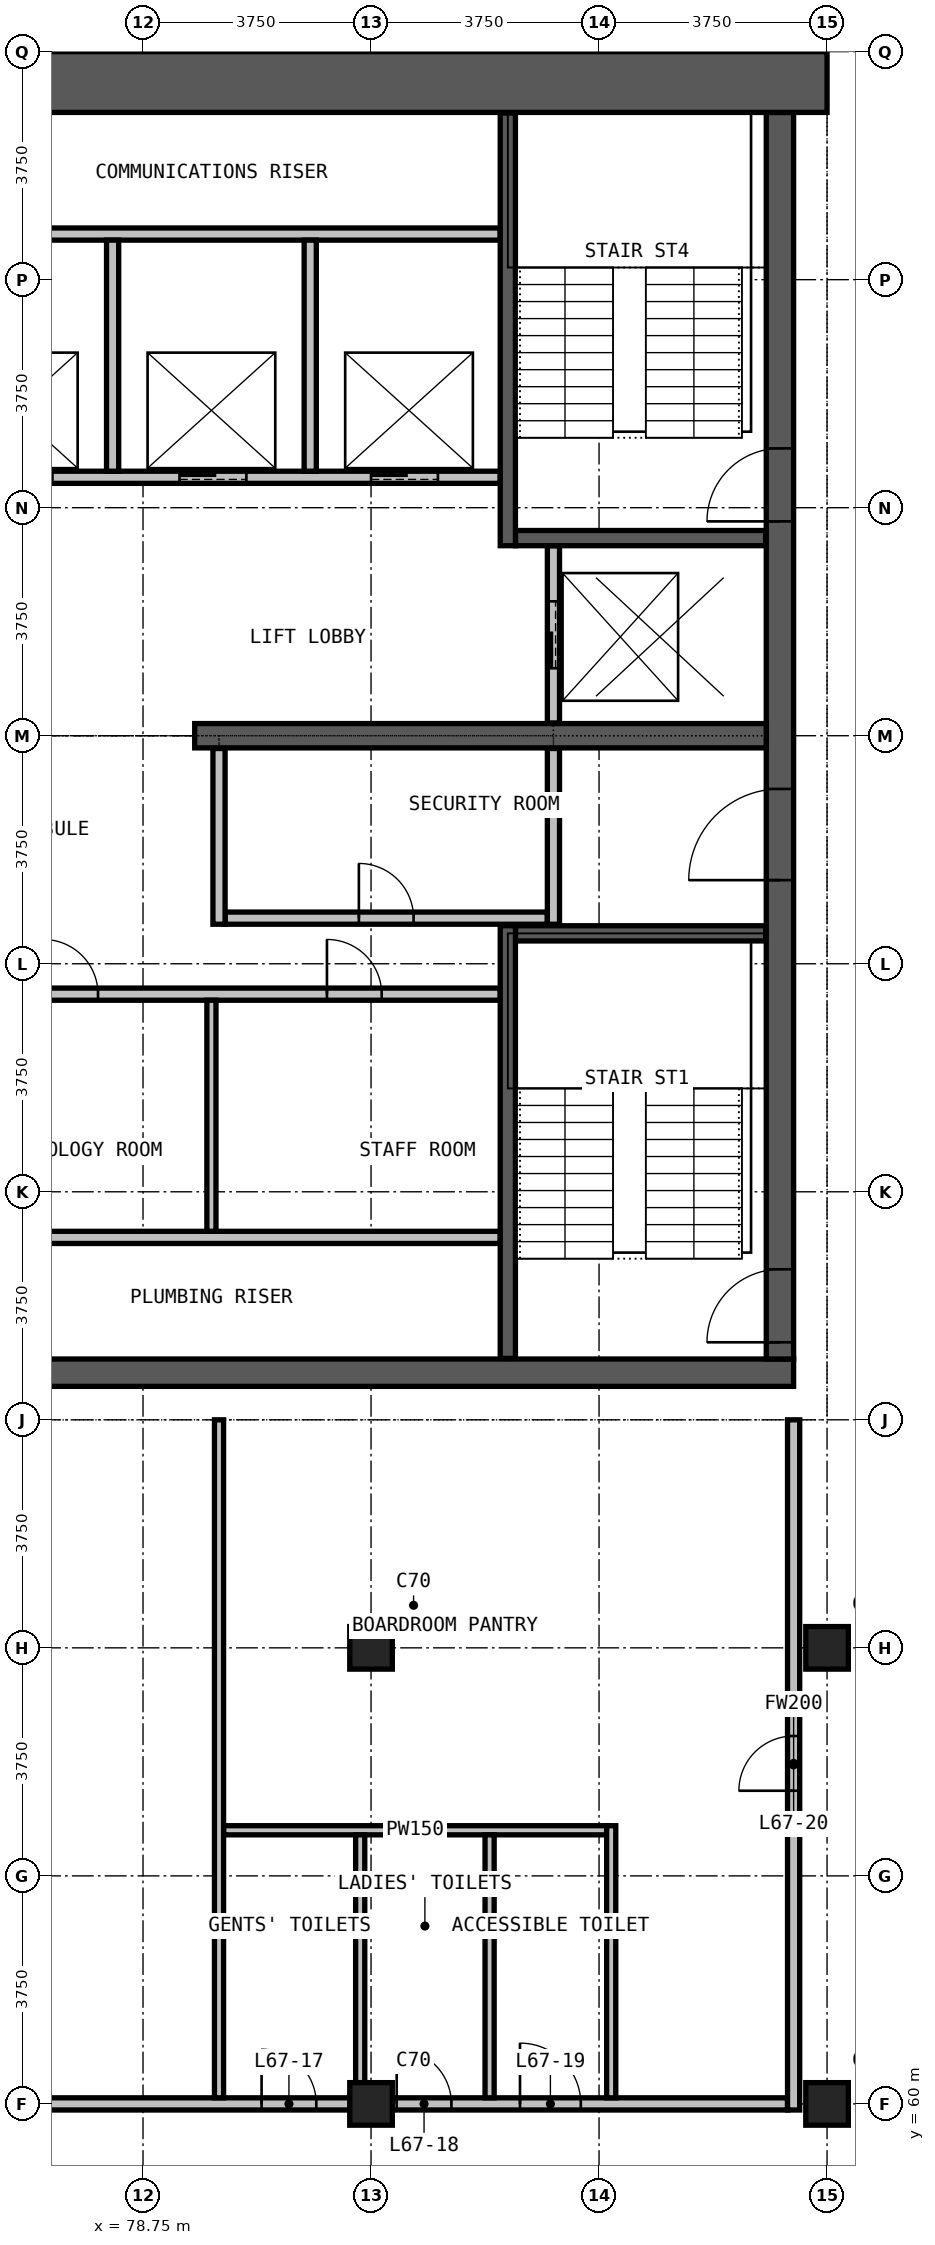
"""IFC4 building model, lengths in metres.
Left out: names, types, materials, properties, quantities, classifications, styles, units other than length and angle.
Written with IfcOpenShell. Run it as: python <this file> out.ifc"""

import sys

from ifc_helpers import new_model, si_unit, direction, frame, frame_2d, origin, origin_2d, place, context, subcontext, project, spatial, rectangle, extrude, element, fill, save


model = new_model("IFC4")
c1 = context("Model", 3, precision=1e-05, world=origin(), true_north=direction((0.0, 1.0)))
c2 = subcontext(c1, "Body", "Model", "MODEL_VIEW")
j1 = project(units=[si_unit("LENGTHUNIT", "METRE"), si_unit("PLANEANGLEUNIT", "RADIAN")], contexts=[c1])
p1 = place(None, origin())
s1 = spatial("IfcSite", under=j1, at=p1, CompositionType="ELEMENT")
p2 = place(p1, origin())
s2 = spatial("IfcBuilding", under=s1, at=p2, CompositionType="ELEMENT")
p3 = place(p2, frame((0.0, 0.0, 258.5)))
s3 = spatial("IfcBuildingStorey", under=s2, at=p3, CompositionType="ELEMENT", Elevation=258.5)
for number, where, z_axis, x_axis in (
    (1, (82.5, 60.0, 0.0), (0.0, 0.0, 1.0), (1.0, 0.0, 0.0)),
    (2, (82.5, 67.5, 0.0), (0.0, 0.0, 1.0), (1.0, 0.0, 0.0)),
    (3, (90.0, 60.0, 0.0), (0.0, 0.0, 1.0), (1.0, 0.0, 0.0)),
    (4, (90.0, 67.5, 0.0), (0.0, 0.0, 1.0), (1.0, 0.0, 0.0)),
):
    element("IfcColumn", number, at=place(p3, frame(where, z_axis=z_axis, x_axis=x_axis)), inside=s3, PredefinedType="COLUMN", context=c2, shape_type="SweptSolid", body=[
        extrude(rectangle(XDim=0.7, YDim=0.7, at=origin_2d()), origin(), (0.0, 0.0, 1.0), 3.6),
    ])
p4 = place(p3, frame((60.55, 72.025, 0.0), z_axis=(0.0, 0.0, 1.0), x_axis=(1.0, 0.0, 0.0)))
e5 = element("IfcWall", 5, at=p4, inside=s3, PredefinedType="SHEAR", context=c2, shape_type="SweptSolid", body=[
    extrude(rectangle(XDim=28.9, YDim=0.45, at=frame_2d((14.45, 0.0))), origin(), (0.0, 0.0, 1.0), 3.6),
])
p5 = place(p3, frame((89.225, 72.25, 0.0), z_axis=(0.0, 0.0, 1.0), x_axis=(0.0, 1.0, 0.0)))
e6 = element("IfcWall", 6, at=p5, inside=s3, PredefinedType="SHEAR", context=c2, shape_type="SweptSolid", body=[
    extrude(rectangle(XDim=20.5, YDim=0.45, at=frame_2d((10.25, 0.0))), origin(), (0.0, 0.0, 1.0), 3.6),
])
p6 = place(p5, frame((0.275, 0.0, 0.0)))
e7 = element("IfcOpeningElement", 7, at=p6, cuts=e6, PredefinedType="OPENING", context=c2, shape_type="SweptSolid", body=[
    extrude(rectangle(XDim=1.2, YDim=2.2, at=frame_2d((0.6, 1.1))), frame((0.0, 0.235, 0.0), z_axis=(0.0, -1.0, 0.0), x_axis=(1.0, 0.0, 0.0)), (0.0, 0.0, 1.0), 0.47),
])
p7 = place(p5, frame((13.775, 0.0, 0.0)))
e8 = element("IfcOpeningElement", 8, at=p7, cuts=e6, PredefinedType="OPENING", context=c2, shape_type="SweptSolid", body=[
    extrude(rectangle(XDim=1.2, YDim=2.2, at=frame_2d((0.6, 1.1))), frame((0.0, 0.235, 0.0), z_axis=(0.0, -1.0, 0.0), x_axis=(1.0, 0.0, 0.0)), (0.0, 0.0, 1.0), 0.47),
])
p8 = place(p5, frame((7.875, 0.0, 0.0)))
e9 = element("IfcOpeningElement", 9, at=p8, cuts=e6, PredefinedType="OPENING", context=c2, shape_type="SweptSolid", body=[
    extrude(rectangle(XDim=1.5, YDim=2.2, at=frame_2d((0.75, 1.1))), frame((0.0, 0.235, 0.0), z_axis=(0.0, -1.0, 0.0), x_axis=(1.0, 0.0, 0.0)), (0.0, 0.0, 1.0), 0.47),
])
p9 = place(p3, frame((90.0, 93.25, 0.0), z_axis=(0.0, 0.0, 1.0), x_axis=(-1.0, 0.0, 0.0)))
e10 = element("IfcWall", 10, at=p9, inside=s3, PredefinedType="SHEAR", context=c2, shape_type="SweptSolid", body=[
    extrude(rectangle(XDim=30.0, YDim=1.0, at=frame_2d((15.0, 0.0))), origin(), (0.0, 0.0, 1.0), 3.6),
])
p10 = place(p3, frame((79.6, 82.5, 0.0), z_axis=(0.0, 0.0, 1.0), x_axis=(1.0, 0.0, 0.0)))
e11 = element("IfcWall", 11, at=p10, inside=s3, PredefinedType="SHEAR", context=c2, shape_type="SweptSolid", body=[
    extrude(rectangle(XDim=9.4, YDim=0.4, at=frame_2d((4.7, 0.0))), origin(), (0.0, 0.0, 1.0), 3.6),
])
p11 = place(p3, frame((75.21, 74.25, 0.0), z_axis=(0.0, 0.0, 1.0), x_axis=(1.0, 0.0, 0.0)))
e12 = element("IfcWall", 12, at=p11, inside=s3, PredefinedType="PARTITIONING", context=c2, shape_type="SweptSolid", body=[
    extrude(rectangle(XDim=9.415, YDim=0.2, at=frame_2d((4.708, 0.0))), origin(), (0.0, 0.0, 1.0), 3.3),
])
p12 = place(p3, frame((75.21, 78.25, 0.0), z_axis=(0.0, 0.0, 1.0), x_axis=(1.0, 0.0, 0.0)))
e13 = element("IfcWall", 13, at=p12, inside=s3, PredefinedType="PARTITIONING", context=c2, shape_type="SweptSolid", body=[
    extrude(rectangle(XDim=9.415, YDim=0.2, at=frame_2d((4.708, 0.0))), origin(), (0.0, 0.0, 1.0), 3.3),
])
p13 = place(p12, frame((1.9, 0.0, 0.0)))
e14 = element("IfcOpeningElement", 14, at=p13, cuts=e13, PredefinedType="OPENING", context=c2, shape_type="SweptSolid", body=[
    extrude(rectangle(XDim=0.9, YDim=2.2, at=frame_2d((0.45, 1.1))), frame((0.0, 0.11, 0.0), z_axis=(0.0, -1.0, 0.0), x_axis=(1.0, 0.0, 0.0)), (0.0, 0.0, 1.0), 0.22),
])
p14 = place(p12, frame((6.565, 0.0, 0.0)))
e15 = element("IfcOpeningElement", 15, at=p14, cuts=e13, PredefinedType="OPENING", context=c2, shape_type="SweptSolid", body=[
    extrude(rectangle(XDim=0.9, YDim=2.2, at=frame_2d((0.45, 1.1))), frame((0.0, 0.11, 0.0), z_axis=(0.0, -1.0, 0.0), x_axis=(1.0, 0.0, 0.0)), (0.0, 0.0, 1.0), 0.22),
])
p15 = place(p3, frame((80.1, 79.5, 0.0), z_axis=(0.0, 0.0, 1.0), x_axis=(1.0, 0.0, 0.0)))
e16 = element("IfcWall", 16, at=p15, inside=s3, PredefinedType="PARTITIONING", context=c2, shape_type="SweptSolid", body=[
    extrude(rectangle(XDim=5.3, YDim=0.2, at=frame_2d((2.65, 0.0))), origin(), (0.0, 0.0, 1.0), 3.3),
])
p16 = place(p15, frame((2.2, 0.0, 0.0)))
e17 = element("IfcOpeningElement", 17, at=p16, cuts=e16, PredefinedType="OPENING", context=c2, shape_type="SweptSolid", body=[
    extrude(rectangle(XDim=0.9, YDim=2.2, at=frame_2d((0.45, 1.1))), frame((0.0, 0.11, 0.0), z_axis=(0.0, -1.0, 0.0), x_axis=(1.0, 0.0, 0.0)), (0.0, 0.0, 1.0), 0.22),
])
for number, where, z_axis, x_axis in (
    (18, (80.0, 79.4, 0.0), (0.0, 0.0, 1.0), (0.0, 1.0, 0.0)),
    (19, (85.5, 79.4, 0.0), (0.0, 0.0, 1.0), (0.0, 1.0, 0.0)),
):
    element("IfcWall", number, at=place(p3, frame(where, z_axis=z_axis, x_axis=x_axis)), inside=s3, PredefinedType="PARTITIONING", context=c2, shape_type="SweptSolid", body=[
        extrude(rectangle(XDim=2.89, YDim=0.2, at=frame_2d((1.445, 0.0))), origin(), (0.0, 0.0, 1.0), 3.3),
    ])
p17 = place(p3, frame((60.65, 60.0, 0.0), z_axis=(0.0, 0.0, 1.0), x_axis=(1.0, 0.0, 0.0)))
e20 = element("IfcWall", 20, at=p17, inside=s3, PredefinedType="PARTITIONING", context=c2, shape_type="SweptSolid", body=[
    extrude(rectangle(XDim=28.7, YDim=0.2, at=frame_2d((14.35, 0.0))), origin(), (0.0, 0.0, 1.0), 3.3),
])
p18 = place(p17, frame((13.0, 0.0, 0.0)))
e21 = element("IfcOpeningElement", 21, at=p18, cuts=e20, PredefinedType="OPENING", context=c2, shape_type="SweptSolid", body=[
    extrude(rectangle(XDim=1.0, YDim=2.2, at=frame_2d((0.5, 1.1))), frame((0.0, 0.11, 0.0), z_axis=(0.0, -1.0, 0.0), x_axis=(1.0, 0.0, 0.0)), (0.0, 0.0, 1.0), 0.22),
])
p19 = place(p17, frame((20.05, 0.0, 0.0)))
e22 = element("IfcOpeningElement", 22, at=p19, cuts=e20, PredefinedType="OPENING", context=c2, shape_type="SweptSolid", body=[
    extrude(rectangle(XDim=0.9, YDim=2.2, at=frame_2d((0.45, 1.1))), frame((0.0, 0.11, 0.0), z_axis=(0.0, -1.0, 0.0), x_axis=(1.0, 0.0, 0.0)), (0.0, 0.0, 1.0), 0.22),
])
p20 = place(p17, frame((22.272, 0.0, 0.0)))
e23 = element("IfcOpeningElement", 23, at=p20, cuts=e20, PredefinedType="OPENING", context=c2, shape_type="SweptSolid", body=[
    extrude(rectangle(XDim=0.9, YDim=2.2, at=frame_2d((0.45, 1.1))), frame((0.0, 0.11, 0.0), z_axis=(0.0, -1.0, 0.0), x_axis=(1.0, 0.0, 0.0)), (0.0, 0.0, 1.0), 0.22),
])
p21 = place(p17, frame((24.3, 0.0, 0.0)))
e24 = element("IfcOpeningElement", 24, at=p21, cuts=e20, PredefinedType="OPENING", context=c2, shape_type="SweptSolid", body=[
    extrude(rectangle(XDim=1.0, YDim=2.2, at=frame_2d((0.5, 1.1))), frame((0.0, 0.11, 0.0), z_axis=(0.0, -1.0, 0.0), x_axis=(1.0, 0.0, 0.0)), (0.0, 0.0, 1.0), 0.22),
])
p22 = place(p3, frame((89.45, 59.9, 0.0), z_axis=(0.0, 0.0, 1.0), x_axis=(0.0, 1.0, 0.0)))
e25 = element("IfcWall", 25, at=p22, inside=s3, PredefinedType="PARTITIONING", context=c2, shape_type="SweptSolid", body=[
    extrude(rectangle(XDim=11.35, YDim=0.2, at=frame_2d((5.675, 0.0))), origin(), (0.0, 0.0, 1.0), 3.3),
])
p23 = place(p22, frame((5.25, 0.0, 0.0)))
e26 = element("IfcOpeningElement", 26, at=p23, cuts=e25, PredefinedType="OPENING", context=c2, shape_type="SweptSolid", body=[
    extrude(rectangle(XDim=0.9, YDim=2.2, at=frame_2d((0.45, 1.1))), frame((0.0, 0.11, 0.0), z_axis=(0.0, -1.0, 0.0), x_axis=(1.0, 0.0, 0.0)), (0.0, 0.0, 1.0), 0.22),
])
p24 = place(p3, frame((80.075, 64.5, 0.0), z_axis=(0.0, 0.0, 1.0), x_axis=(1.0, 0.0, 0.0)))
e27 = element("IfcWall", 27, at=p24, inside=s3, PredefinedType="PARTITIONING", context=c2, shape_type="SweptSolid", body=[
    extrude(rectangle(XDim=6.3, YDim=0.15, at=frame_2d((3.15, 0.0))), origin(), (0.0, 0.0, 1.0), 3.3),
])
p25 = place(p3, frame((79.875, 74.35, 0.0), z_axis=(0.0, 0.0, 1.0), x_axis=(0.0, 1.0, 0.0)))
e28 = element("IfcWall", 28, at=p25, inside=s3, PredefinedType="PARTITIONING", context=c2, shape_type="SweptSolid", body=[
    extrude(rectangle(XDim=3.8, YDim=0.15, at=frame_2d((1.9, 0.0))), origin(), (0.0, 0.0, 1.0), 3.3),
])
p26 = place(p3, frame((80.0, 60.1, 0.0), z_axis=(0.0, 0.0, 1.0), x_axis=(0.0, 1.0, 0.0)))
e29 = element("IfcWall", 29, at=p26, inside=s3, PredefinedType="PARTITIONING", context=c2, shape_type="SweptSolid", body=[
    extrude(rectangle(XDim=11.15, YDim=0.15, at=frame_2d((5.575, 0.0))), origin(), (0.0, 0.0, 1.0), 3.3),
])
for number, where, z_axis, x_axis in (
    (30, (82.322, 60.1, 0.0), (0.0, 0.0, 1.0), (0.0, 1.0, 0.0)),
    (31, (84.45, 60.1, 0.0), (0.0, 0.0, 1.0), (0.0, 1.0, 0.0)),
):
    element("IfcWall", number, at=place(p3, frame(where, z_axis=z_axis, x_axis=x_axis)), inside=s3, PredefinedType="PARTITIONING", context=c2, shape_type="SweptSolid", body=[
        extrude(rectangle(XDim=4.325, YDim=0.15, at=frame_2d((2.163, 0.0))), origin(), (0.0, 0.0, 1.0), 3.3),
    ])
p27 = place(p3, frame((86.45, 60.1, 0.0), z_axis=(0.0, 0.0, 1.0), x_axis=(0.0, 1.0, 0.0)))
e32 = element("IfcWall", 32, at=p27, inside=s3, PredefinedType="PARTITIONING", context=c2, shape_type="SweptSolid", body=[
    extrude(rectangle(XDim=4.475, YDim=0.15, at=frame_2d((2.237, 0.0))), origin(), (0.0, 0.0, 1.0), 3.3),
])
p28 = place(p3, frame((75.21, 86.75, 0.0), z_axis=(0.0, 0.0, 1.0), x_axis=(1.0, 0.0, 0.0)))
e33 = element("IfcWall", 33, at=p28, inside=s3, PredefinedType="PARTITIONING", context=c2, shape_type="SweptSolid", body=[
    extrude(rectangle(XDim=9.415, YDim=0.2, at=frame_2d((4.708, 0.0))), origin(), (0.0, 0.0, 1.0), 3.3),
])
p29 = place(p28, frame((0.95, 0.0, 0.0)))
e34 = element("IfcOpeningElement", 34, at=p29, cuts=e33, PredefinedType="OPENING", context=c2, shape_type="SweptSolid", body=[
    extrude(rectangle(XDim=1.1, YDim=2.2, at=frame_2d((0.55, 1.1))), frame((0.0, 0.11, 0.0), z_axis=(0.0, -1.0, 0.0), x_axis=(1.0, 0.0, 0.0)), (0.0, 0.0, 1.0), 0.22),
])
p30 = place(p28, frame((4.14, 0.0, 0.0)))
e35 = element("IfcOpeningElement", 35, at=p30, cuts=e33, PredefinedType="OPENING", context=c2, shape_type="SweptSolid", body=[
    extrude(rectangle(XDim=1.1, YDim=2.2, at=frame_2d((0.55, 1.1))), frame((0.0, 0.11, 0.0), z_axis=(0.0, -1.0, 0.0), x_axis=(1.0, 0.0, 0.0)), (0.0, 0.0, 1.0), 0.22),
])
p31 = place(p28, frame((7.29, 0.0, 0.0)))
e36 = element("IfcOpeningElement", 36, at=p31, cuts=e33, PredefinedType="OPENING", context=c2, shape_type="SweptSolid", body=[
    extrude(rectangle(XDim=1.1, YDim=2.2, at=frame_2d((0.55, 1.1))), frame((0.0, 0.11, 0.0), z_axis=(0.0, -1.0, 0.0), x_axis=(1.0, 0.0, 0.0)), (0.0, 0.0, 1.0), 0.22),
])
p32 = place(p3, frame((75.21, 90.75, 0.0), z_axis=(0.0, 0.0, 1.0), x_axis=(1.0, 0.0, 0.0)))
e37 = element("IfcWall", 37, at=p32, inside=s3, PredefinedType="PARTITIONING", context=c2, shape_type="SweptSolid", body=[
    extrude(rectangle(XDim=9.415, YDim=0.2, at=frame_2d((4.708, 0.0))), origin(), (0.0, 0.0, 1.0), 3.3),
])
for number, where, z_axis, x_axis in (
    (38, (78.25, 86.85, 0.0), (0.0, 0.0, 1.0), (0.0, 1.0, 0.0)),
    (39, (81.5, 86.85, 0.0), (0.0, 0.0, 1.0), (0.0, 1.0, 0.0)),
):
    element("IfcWall", number, at=place(p3, frame(where, z_axis=z_axis, x_axis=x_axis)), inside=s3, PredefinedType="PARTITIONING", context=c2, shape_type="SweptSolid", body=[
        extrude(rectangle(XDim=3.8, YDim=0.2, at=frame_2d((1.9, 0.0))), origin(), (0.0, 0.0, 1.0), 3.3),
    ])
p33 = place(p3, frame((85.5, 82.71, 0.0), z_axis=(0.0, 0.0, 1.0), x_axis=(0.0, 1.0, 0.0)))
e40 = element("IfcWall", 40, at=p33, inside=s3, PredefinedType="PARTITIONING", context=c2, shape_type="SweptSolid", body=[
    extrude(rectangle(XDim=2.915, YDim=0.2, at=frame_2d((1.458, 0.0))), origin(), (0.0, 0.0, 1.0), 3.3),
])
p34 = place(p33, frame((0.9, 0.0, 0.0)))
e41 = element("IfcOpeningElement", 41, at=p34, cuts=e40, PredefinedType="OPENING", context=c2, shape_type="SweptSolid", body=[
    extrude(rectangle(XDim=1.1, YDim=2.2, at=frame_2d((0.55, 1.1))), frame((0.0, 0.11, 0.0), z_axis=(0.0, -1.0, 0.0), x_axis=(1.0, 0.0, 0.0)), (0.0, 0.0, 1.0), 0.22),
])
for number, where, z_axis, x_axis in (
    (42, (84.875, 79.25, 0.0), (0.0, 0.0, 1.0), (1.0, 0.0, 0.0)),
    (43, (84.875, 85.75, 0.0), (0.0, 0.0, 1.0), (1.0, 0.0, 0.0)),
):
    element("IfcWall", number, at=place(p3, frame(where, z_axis=z_axis, x_axis=x_axis)), inside=s3, PredefinedType="PARTITIONING", context=c2, shape_type="SweptSolid", body=[
        extrude(rectangle(XDim=4.115, YDim=0.25, at=frame_2d((2.058, 0.0))), origin(), (0.0, 0.0, 1.0), 3.3),
    ])
for number, where, z_axis, x_axis in (
    (44, (84.75, 72.26, 0.0), (0.0, 0.0, 1.0), (0.0, 1.0, 0.0)),
    (45, (84.75, 85.625, 0.0), (0.0, 0.0, 1.0), (0.0, 1.0, 0.0)),
):
    element("IfcWall", number, at=place(p3, frame(where, z_axis=z_axis, x_axis=x_axis)), inside=s3, PredefinedType="PARTITIONING", context=c2, shape_type="SweptSolid", body=[
        extrude(rectangle(XDim=7.115, YDim=0.25, at=frame_2d((3.558, 0.0))), origin(), (0.0, 0.0, 1.0), 3.3),
    ])
p35 = place(p29, origin())
e46 = element("IfcDoor", 46, at=p35, inside=s3, OperationType="DOUBLE_DOOR_SLIDING", PredefinedType="DOOR", context=c2, shape_type="SweptSolid", body=[
    extrude(rectangle(XDim=1.1, YDim=2.2, at=frame_2d((0.55, 1.1))), frame((0.0, 0.025, 0.0), z_axis=(0.0, -1.0, 0.0), x_axis=(1.0, 0.0, 0.0)), (0.0, 0.0, 1.0), 0.05),
])
fill(e34, e46)
p36 = place(p30, origin())
e47 = element("IfcDoor", 47, at=p36, inside=s3, OperationType="DOUBLE_DOOR_SLIDING", PredefinedType="DOOR", context=c2, shape_type="SweptSolid", body=[
    extrude(rectangle(XDim=1.1, YDim=2.2, at=frame_2d((0.55, 1.1))), frame((0.0, 0.025, 0.0), z_axis=(0.0, -1.0, 0.0), x_axis=(1.0, 0.0, 0.0)), (0.0, 0.0, 1.0), 0.05),
])
fill(e35, e47)
p37 = place(p31, origin())
e48 = element("IfcDoor", 48, at=p37, inside=s3, OperationType="DOUBLE_DOOR_SLIDING", PredefinedType="DOOR", context=c2, shape_type="SweptSolid", body=[
    extrude(rectangle(XDim=1.1, YDim=2.2, at=frame_2d((0.55, 1.1))), frame((0.0, 0.025, 0.0), z_axis=(0.0, -1.0, 0.0), x_axis=(1.0, 0.0, 0.0)), (0.0, 0.0, 1.0), 0.05),
])
fill(e36, e48)
p38 = place(p34, origin())
e49 = element("IfcDoor", 49, at=p38, inside=s3, OperationType="DOUBLE_DOOR_SLIDING", PredefinedType="DOOR", context=c2, shape_type="SweptSolid", body=[
    extrude(rectangle(XDim=1.1, YDim=2.2, at=frame_2d((0.55, 1.1))), frame((0.0, 0.025, 0.0), z_axis=(0.0, -1.0, 0.0), x_axis=(1.0, 0.0, 0.0)), (0.0, 0.0, 1.0), 0.05),
])
fill(e41, e49)
p39 = place(p6, origin())
e50 = element("IfcDoor", 50, at=p39, inside=s3, OperationType="SINGLE_SWING_LEFT", PredefinedType="DOOR", context=c2, shape_type="SweptSolid", body=[
    extrude(rectangle(XDim=1.2, YDim=2.2, at=frame_2d((0.6, 1.1))), frame((0.0, 0.025, 0.0), z_axis=(0.0, -1.0, 0.0), x_axis=(1.0, 0.0, 0.0)), (0.0, 0.0, 1.0), 0.05),
])
fill(e7, e50)
p40 = place(p7, origin())
e51 = element("IfcDoor", 51, at=p40, inside=s3, OperationType="SINGLE_SWING_RIGHT", PredefinedType="DOOR", context=c2, shape_type="SweptSolid", body=[
    extrude(rectangle(XDim=1.2, YDim=2.2, at=frame_2d((0.6, 1.1))), frame((0.0, 0.025, 0.0), z_axis=(0.0, -1.0, 0.0), x_axis=(1.0, 0.0, 0.0)), (0.0, 0.0, 1.0), 0.05),
])
fill(e8, e51)
p41 = place(p8, origin())
e52 = element("IfcDoor", 52, at=p41, inside=s3, OperationType="DOUBLE_DOOR_SINGLE_SWING", PredefinedType="DOOR", context=c2, shape_type="SweptSolid", body=[
    extrude(rectangle(XDim=1.5, YDim=2.2, at=frame_2d((0.75, 1.1))), frame((0.0, 0.025, 0.0), z_axis=(0.0, -1.0, 0.0), x_axis=(1.0, 0.0, 0.0)), (0.0, 0.0, 1.0), 0.05),
])
fill(e9, e52)
p42 = place(p16, origin())
e53 = element("IfcDoor", 53, at=p42, inside=s3, OperationType="SINGLE_SWING_LEFT", PredefinedType="DOOR", context=c2, shape_type="SweptSolid", body=[
    extrude(rectangle(XDim=0.9, YDim=2.2, at=frame_2d((0.45, 1.1))), frame((0.0, 0.025, 0.0), z_axis=(0.0, -1.0, 0.0), x_axis=(1.0, 0.0, 0.0)), (0.0, 0.0, 1.0), 0.05),
])
fill(e17, e53)
p43 = place(p13, origin())
e54 = element("IfcDoor", 54, at=p43, inside=s3, OperationType="SINGLE_SWING_RIGHT", PredefinedType="DOOR", context=c2, shape_type="SweptSolid", body=[
    extrude(rectangle(XDim=0.9, YDim=2.2, at=frame_2d((0.45, 1.1))), frame((0.0, 0.025, 0.0), z_axis=(0.0, -1.0, 0.0), x_axis=(1.0, 0.0, 0.0)), (0.0, 0.0, 1.0), 0.05),
])
fill(e14, e54)
p44 = place(p14, origin())
e55 = element("IfcDoor", 55, at=p44, inside=s3, OperationType="SINGLE_SWING_RIGHT", PredefinedType="DOOR", context=c2, shape_type="SweptSolid", body=[
    extrude(rectangle(XDim=0.9, YDim=2.2, at=frame_2d((0.45, 1.1))), frame((0.0, 0.025, 0.0), z_axis=(0.0, -1.0, 0.0), x_axis=(1.0, 0.0, 0.0)), (0.0, 0.0, 1.0), 0.05),
])
fill(e15, e55)
p45 = place(p19, origin())
e56 = element("IfcDoor", 56, at=p45, inside=s3, OperationType="SINGLE_SWING_RIGHT", PredefinedType="DOOR", context=c2, shape_type="SweptSolid", body=[
    extrude(rectangle(XDim=0.9, YDim=2.2, at=frame_2d((0.45, 1.1))), frame((0.0, 0.025, 0.0), z_axis=(0.0, -1.0, 0.0), x_axis=(1.0, 0.0, 0.0)), (0.0, 0.0, 1.0), 0.05),
])
fill(e22, e56)
p46 = place(p20, origin())
e57 = element("IfcDoor", 57, at=p46, inside=s3, OperationType="SINGLE_SWING_LEFT", PredefinedType="DOOR", context=c2, shape_type="SweptSolid", body=[
    extrude(rectangle(XDim=0.9, YDim=2.2, at=frame_2d((0.45, 1.1))), frame((0.0, 0.025, 0.0), z_axis=(0.0, -1.0, 0.0), x_axis=(1.0, 0.0, 0.0)), (0.0, 0.0, 1.0), 0.05),
])
fill(e23, e57)
p47 = place(p21, origin())
e58 = element("IfcDoor", 58, at=p47, inside=s3, OperationType="SINGLE_SWING_LEFT", PredefinedType="DOOR", context=c2, shape_type="SweptSolid", body=[
    extrude(rectangle(XDim=1.0, YDim=2.2, at=frame_2d((0.5, 1.1))), frame((0.0, 0.025, 0.0), z_axis=(0.0, -1.0, 0.0), x_axis=(1.0, 0.0, 0.0)), (0.0, 0.0, 1.0), 0.05),
])
fill(e24, e58)
p48 = place(p23, origin())
e59 = element("IfcDoor", 59, at=p48, inside=s3, OperationType="SINGLE_SWING_LEFT", PredefinedType="DOOR", context=c2, shape_type="SweptSolid", body=[
    extrude(rectangle(XDim=0.9, YDim=2.2, at=frame_2d((0.45, 1.1))), frame((0.0, 0.025, 0.0), z_axis=(0.0, -1.0, 0.0), x_axis=(1.0, 0.0, 0.0)), (0.0, 0.0, 1.0), 0.05),
])
fill(e26, e59)
save(model, sys.argv[1])
